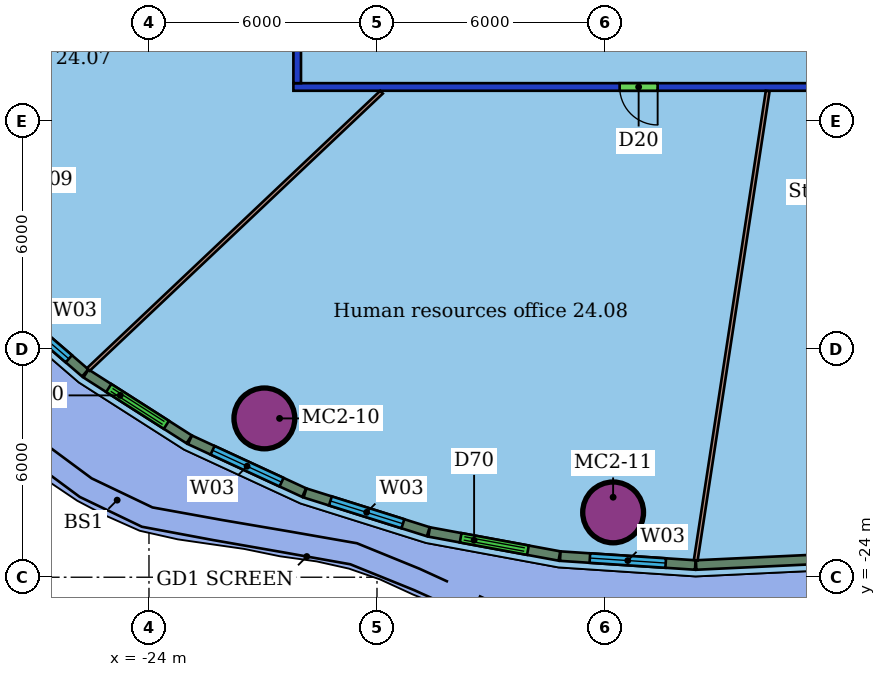
"""IFC4 building model, lengths in metres.
Left out: names, types, materials, properties, quantities, classifications, styles, units other than length and angle.
Written with IfcOpenShell. Run it as: python <this file> out.ifc"""

import sys

from ifc_helpers import new_model, si_unit, direction, frame, frame_2d, origin, origin_2d, place, context, subcontext, project, spatial, rectangle, hollow_circle, extrude, element, fill, save


model = new_model("IFC4")
c1 = context("Model", 3, precision=1e-05, world=origin(), true_north=direction((0.0, 1.0)))
c2 = subcontext(c1, "Body", "Model", "MODEL_VIEW")
j1 = project(units=[si_unit("LENGTHUNIT", "METRE"), si_unit("PLANEANGLEUNIT", "RADIAN")], contexts=[c1])
p1 = place(None, origin())
s1 = spatial("IfcSite", under=j1, at=p1, CompositionType="ELEMENT")
p2 = place(p1, origin())
s2 = spatial("IfcBuilding", under=s1, at=p2, CompositionType="ELEMENT")
p3 = place(p2, frame((0.0, 0.0, 106.6)))
s3 = spatial("IfcBuildingStorey", under=s2, at=p3, CompositionType="ELEMENT", Elevation=106.6)
for number, where, z_axis, x_axis in (
    (1, (-20.963, -19.821, 0.0), (0.0, 0.0, 1.0), (1.0, 0.0, 0.0)),
    (2, (-11.787, -22.294, 0.0), (0.0, 0.0, 1.0), (1.0, 0.0, 0.0)),
):
    element("IfcColumn", number, at=place(p3, frame(where, z_axis=z_axis, x_axis=x_axis)), inside=s3, PredefinedType="COLUMN", context=c2, shape_type="SweptSolid", body=[
        extrude(hollow_circle(Radius=0.8, WallThickness=0.055, at=origin_2d()), origin(), (0.0, 0.0, 1.0), 3.45),
    ])
p4 = place(p3, frame((8.2, -11.1, 0.0), z_axis=(0.0, 0.0, 1.0), x_axis=(-1.0, 0.0, 0.0)))
e3 = element("IfcWall", 3, at=p4, inside=s3, PredefinedType="PARTITIONING", context=c2, shape_type="SweptSolid", body=[
    extrude(rectangle(XDim=28.4, YDim=0.2, at=frame_2d((14.2, 0.0))), origin(), (0.0, 0.0, 1.0), 3.0),
])
p5 = place(p4, frame((18.815, 0.0, 0.0)))
e4 = element("IfcOpeningElement", 4, at=p5, cuts=e3, PredefinedType="OPENING", context=c2, shape_type="SweptSolid", body=[
    extrude(rectangle(XDim=1.0, YDim=2.1, at=frame_2d((0.5, 1.05))), frame((0.0, 0.11, 0.0), z_axis=(0.0, -1.0, 0.0), x_axis=(1.0, 0.0, 0.0)), (0.0, 0.0, 1.0), 0.22),
])
p6 = place(p4, frame((9.712, 0.0, 0.0)))
e5 = element("IfcOpeningElement", 5, at=p6, cuts=e3, PredefinedType="OPENING", context=c2, shape_type="SweptSolid", body=[
    extrude(rectangle(XDim=1.8, YDim=2.1, at=frame_2d((0.9, 1.05))), frame((0.0, 0.11, 0.0), z_axis=(0.0, -1.0, 0.0), x_axis=(1.0, 0.0, 0.0)), (0.0, 0.0, 1.0), 0.22),
])
p7 = place(p3, frame((-20.1, -11.0, 0.0), z_axis=(0.0, 0.0, 1.0), x_axis=(0.0, 1.0, 0.0)))
e6 = element("IfcWall", 6, at=p7, inside=s3, PredefinedType="PARTITIONING", context=c2, shape_type="SweptSolid", body=[
    extrude(rectangle(XDim=22.0, YDim=0.2, at=frame_2d((11.0, 0.0))), origin(), (0.0, 0.0, 1.0), 3.0),
])
p8 = place(p7, frame((15.196, 0.0, 0.0)))
e7 = element("IfcOpeningElement", 7, at=p8, cuts=e6, PredefinedType="OPENING", context=c2, shape_type="SweptSolid", body=[
    extrude(rectangle(XDim=1.5, YDim=2.1, at=frame_2d((0.75, 1.05))), frame((0.0, 0.11, 0.0), z_axis=(0.0, -1.0, 0.0), x_axis=(1.0, 0.0, 0.0)), (0.0, 0.0, 1.0), 0.22),
])
p9 = place(p7, frame((8.793, 0.0, 0.0)))
e8 = element("IfcOpeningElement", 8, at=p9, cuts=e6, PredefinedType="OPENING", context=c2, shape_type="SweptSolid", body=[
    extrude(rectangle(XDim=0.9, YDim=2.1, at=frame_2d((0.45, 1.05))), frame((0.0, 0.11, 0.0), z_axis=(0.0, -1.0, 0.0), x_axis=(1.0, 0.0, 0.0)), (0.0, 0.0, 1.0), 0.22),
])
p10 = place(p7, frame((4.634, 0.0, 0.0)))
e9 = element("IfcOpeningElement", 9, at=p10, cuts=e6, PredefinedType="OPENING", context=c2, shape_type="SweptSolid", body=[
    extrude(rectangle(XDim=1.0, YDim=2.1, at=frame_2d((0.5, 1.05))), frame((0.0, 0.11, 0.0), z_axis=(0.0, -1.0, 0.0), x_axis=(1.0, 0.0, 0.0)), (0.0, 0.0, 1.0), 0.22),
])
p11 = place(p3, frame((-25.594, -18.532, 0.0), z_axis=(0.0, 0.0, 1.0), x_axis=(0.7265168172, 0.687148684293, 0.0)))
e10 = element("IfcWall", 10, at=p11, inside=s3, PredefinedType="PARTITIONING", context=c2, shape_type="SweptSolid", body=[
    extrude(rectangle(XDim=10.617, YDim=0.1, at=frame_2d((5.309, 0.0))), origin(), (0.0, 0.0, 1.0), 3.45),
])
p12 = place(p3, frame((-9.612, -23.554, 0.0), z_axis=(0.0, 0.0, 1.0), x_axis=(0.15159598099, 0.988442541855, 0.0)))
e11 = element("IfcWall", 11, at=p12, inside=s3, PredefinedType="PARTITIONING", context=c2, shape_type="SweptSolid", body=[
    extrude(rectangle(XDim=12.491, YDim=0.1, at=frame_2d((6.245, 0.0))), origin(), (0.0, 0.0, 1.0), 3.45),
])
p13 = place(p3, frame((-28.056, -16.577, 0.0), z_axis=(0.0, 0.0, 1.0), x_axis=(0.757892764479, -0.652379151683, 0.0)))
e12 = element("IfcWall", 12, at=p13, inside=s3, PredefinedType="SOLIDWALL", context=c2, shape_type="SweptSolid", body=[
    extrude(rectangle(XDim=3.137, YDim=0.25, at=frame_2d((1.569, 0.0))), origin(), (0.0, 0.0, 1.0), 3.05),
])
p14 = place(p13, frame((0.569, 0.0, 0.9)))
e13 = element("IfcOpeningElement", 13, at=p14, cuts=e12, PredefinedType="OPENING", context=c2, shape_type="SweptSolid", body=[
    extrude(rectangle(XDim=2.0, YDim=2.1, at=frame_2d((1.0, 1.05))), frame((0.0, 0.135, 0.0), z_axis=(0.0, -1.0, 0.0), x_axis=(1.0, 0.0, 0.0)), (0.0, 0.0, 1.0), 0.27),
])
p15 = place(p3, frame((-25.657, -18.639, 0.0), z_axis=(0.0, 0.0, 1.0), x_axis=(0.842783191824, -0.538253185387, 0.0)))
e14 = element("IfcWall", 14, at=p15, inside=s3, PredefinedType="SOLIDWALL", context=c2, shape_type="SweptSolid", body=[
    extrude(rectangle(XDim=3.22, YDim=0.25, at=frame_2d((1.61, 0.0))), origin(), (0.0, 0.0, 1.0), 3.05),
])
p16 = place(p15, frame((0.71, 0.0, 0.0)))
e15 = element("IfcOpeningElement", 15, at=p16, cuts=e14, PredefinedType="OPENING", context=c2, shape_type="SweptSolid", body=[
    extrude(rectangle(XDim=1.8, YDim=2.4, at=frame_2d((0.9, 1.2))), frame((0.0, 0.135, 0.0), z_axis=(0.0, -1.0, 0.0), x_axis=(1.0, 0.0, 0.0)), (0.0, 0.0, 1.0), 0.27),
])
p17 = place(p3, frame((-22.921, -20.385, 0.0), z_axis=(0.0, 0.0, 1.0), x_axis=(0.907654786829, -0.419717509697, 0.0)))
e16 = element("IfcWall", 16, at=p17, inside=s3, PredefinedType="SOLIDWALL", context=c2, shape_type="SweptSolid", body=[
    extrude(rectangle(XDim=3.31, YDim=0.25, at=frame_2d((1.655, 0.0))), origin(), (0.0, 0.0, 1.0), 3.05),
])
p18 = place(p17, frame((0.655, 0.0, 0.9)))
e17 = element("IfcOpeningElement", 17, at=p18, cuts=e16, PredefinedType="OPENING", context=c2, shape_type="SweptSolid", body=[
    extrude(rectangle(XDim=2.0, YDim=2.1, at=frame_2d((1.0, 1.05))), frame((0.0, 0.135, 0.0), z_axis=(0.0, -1.0, 0.0), x_axis=(1.0, 0.0, 0.0)), (0.0, 0.0, 1.0), 0.27),
])
p19 = place(p3, frame((-19.894, -21.782, 0.0), z_axis=(0.0, 0.0, 1.0), x_axis=(0.953916243861, -0.300072990618, 0.0)))
e18 = element("IfcWall", 18, at=p19, inside=s3, PredefinedType="SOLIDWALL", context=c2, shape_type="SweptSolid", body=[
    extrude(rectangle(XDim=3.401, YDim=0.25, at=frame_2d((1.7, 0.0))), origin(), (0.0, 0.0, 1.0), 3.05),
])
p20 = place(p19, frame((0.7, 0.0, 0.9)))
e19 = element("IfcOpeningElement", 19, at=p20, cuts=e18, PredefinedType="OPENING", context=c2, shape_type="SweptSolid", body=[
    extrude(rectangle(XDim=2.0, YDim=2.1, at=frame_2d((1.0, 1.05))), frame((0.0, 0.135, 0.0), z_axis=(0.0, -1.0, 0.0), x_axis=(1.0, 0.0, 0.0)), (0.0, 0.0, 1.0), 0.27),
])
p21 = place(p3, frame((-16.628, -22.809, 0.0), z_axis=(0.0, 0.0, 1.0), x_axis=(0.983371983657, -0.181602703057, 0.0)))
e20 = element("IfcWall", 20, at=p21, inside=s3, PredefinedType="SOLIDWALL", context=c2, shape_type="SweptSolid", body=[
    extrude(rectangle(XDim=3.486, YDim=0.25, at=frame_2d((1.743, 0.0))), origin(), (0.0, 0.0, 1.0), 3.05),
])
p22 = place(p21, frame((0.843, 0.0, 0.0)))
e21 = element("IfcOpeningElement", 21, at=p22, cuts=e20, PredefinedType="OPENING", context=c2, shape_type="SweptSolid", body=[
    extrude(rectangle(XDim=1.8, YDim=2.4, at=frame_2d((0.9, 1.2))), frame((0.0, 0.135, 0.0), z_axis=(0.0, -1.0, 0.0), x_axis=(1.0, 0.0, 0.0)), (0.0, 0.0, 1.0), 0.27),
])
p23 = place(p3, frame((-13.177, -23.444, 0.0), z_axis=(0.0, 0.0, 1.0), x_axis=(0.997840034655, -0.065690678477, 0.0)))
e22 = element("IfcWall", 22, at=p23, inside=s3, PredefinedType="SOLIDWALL", context=c2, shape_type="SweptSolid", body=[
    extrude(rectangle(XDim=3.56, YDim=0.25, at=frame_2d((1.78, 0.0))), origin(), (0.0, 0.0, 1.0), 3.05),
])
p24 = place(p23, frame((0.78, 0.0, 0.9)))
e23 = element("IfcOpeningElement", 23, at=p24, cuts=e22, PredefinedType="OPENING", context=c2, shape_type="SweptSolid", body=[
    extrude(rectangle(XDim=2.0, YDim=2.1, at=frame_2d((1.0, 1.05))), frame((0.0, 0.135, 0.0), z_axis=(0.0, -1.0, 0.0), x_axis=(1.0, 0.0, 0.0)), (0.0, 0.0, 1.0), 0.27),
])
p25 = place(p3, frame((-9.602, -23.678, 0.0), z_axis=(0.0, 0.0, 1.0), x_axis=(0.998893022407, 0.047039661844, 0.0)))
e24 = element("IfcWall", 24, at=p25, inside=s3, PredefinedType="SOLIDWALL", context=c2, shape_type="SweptSolid", body=[
    extrude(rectangle(XDim=3.576, YDim=0.25, at=frame_2d((1.788, 0.0))), origin(), (0.0, 0.0, 1.0), 3.05),
])
p26 = place(p5, origin())
e25 = element("IfcDoor", 25, at=p26, inside=s3, OperationType="SINGLE_SWING_LEFT", PredefinedType="DOOR", context=c2, shape_type="SweptSolid", body=[
    extrude(rectangle(XDim=1.0, YDim=2.1, at=frame_2d((0.5, 1.05))), frame((0.0, 0.025, 0.0), z_axis=(0.0, -1.0, 0.0), x_axis=(1.0, 0.0, 0.0)), (0.0, 0.0, 1.0), 0.05),
])
fill(e4, e25)
p27 = place(p14, origin())
e26 = element("IfcWindow", 26, at=p27, inside=s3, PartitioningType="SINGLE_PANEL", PredefinedType="WINDOW", context=c2, shape_type="SweptSolid", body=[
    extrude(rectangle(XDim=2.0, YDim=2.1, at=frame_2d((1.0, 1.05))), frame((0.0, 0.03, 0.0), z_axis=(0.0, -1.0, 0.0), x_axis=(1.0, 0.0, 0.0)), (0.0, 0.0, 1.0), 0.06),
])
fill(e13, e26)
p28 = place(p16, origin())
e27 = element("IfcDoor", 27, at=p28, inside=s3, OperationType="DOUBLE_DOOR_SLIDING", PredefinedType="DOOR", context=c2, shape_type="SweptSolid", body=[
    extrude(rectangle(XDim=1.8, YDim=2.4, at=frame_2d((0.9, 1.2))), frame((0.0, 0.025, 0.0), z_axis=(0.0, -1.0, 0.0), x_axis=(1.0, 0.0, 0.0)), (0.0, 0.0, 1.0), 0.05),
])
fill(e15, e27)
p29 = place(p18, origin())
e28 = element("IfcWindow", 28, at=p29, inside=s3, PartitioningType="SINGLE_PANEL", PredefinedType="WINDOW", context=c2, shape_type="SweptSolid", body=[
    extrude(rectangle(XDim=2.0, YDim=2.1, at=frame_2d((1.0, 1.05))), frame((0.0, 0.03, 0.0), z_axis=(0.0, -1.0, 0.0), x_axis=(1.0, 0.0, 0.0)), (0.0, 0.0, 1.0), 0.06),
])
fill(e17, e28)
p30 = place(p20, origin())
e29 = element("IfcWindow", 29, at=p30, inside=s3, PartitioningType="SINGLE_PANEL", PredefinedType="WINDOW", context=c2, shape_type="SweptSolid", body=[
    extrude(rectangle(XDim=2.0, YDim=2.1, at=frame_2d((1.0, 1.05))), frame((0.0, 0.03, 0.0), z_axis=(0.0, -1.0, 0.0), x_axis=(1.0, 0.0, 0.0)), (0.0, 0.0, 1.0), 0.06),
])
fill(e19, e29)
p31 = place(p22, origin())
e30 = element("IfcDoor", 30, at=p31, inside=s3, OperationType="DOUBLE_DOOR_SLIDING", PredefinedType="DOOR", context=c2, shape_type="SweptSolid", body=[
    extrude(rectangle(XDim=1.8, YDim=2.4, at=frame_2d((0.9, 1.2))), frame((0.0, 0.025, 0.0), z_axis=(0.0, -1.0, 0.0), x_axis=(1.0, 0.0, 0.0)), (0.0, 0.0, 1.0), 0.05),
])
fill(e21, e30)
p32 = place(p24, origin())
e31 = element("IfcWindow", 31, at=p32, inside=s3, PartitioningType="SINGLE_PANEL", PredefinedType="WINDOW", context=c2, shape_type="SweptSolid", body=[
    extrude(rectangle(XDim=2.0, YDim=2.1, at=frame_2d((1.0, 1.05))), frame((0.0, 0.03, 0.0), z_axis=(0.0, -1.0, 0.0), x_axis=(1.0, 0.0, 0.0)), (0.0, 0.0, 1.0), 0.06),
])
fill(e23, e31)
save(model, sys.argv[1])
